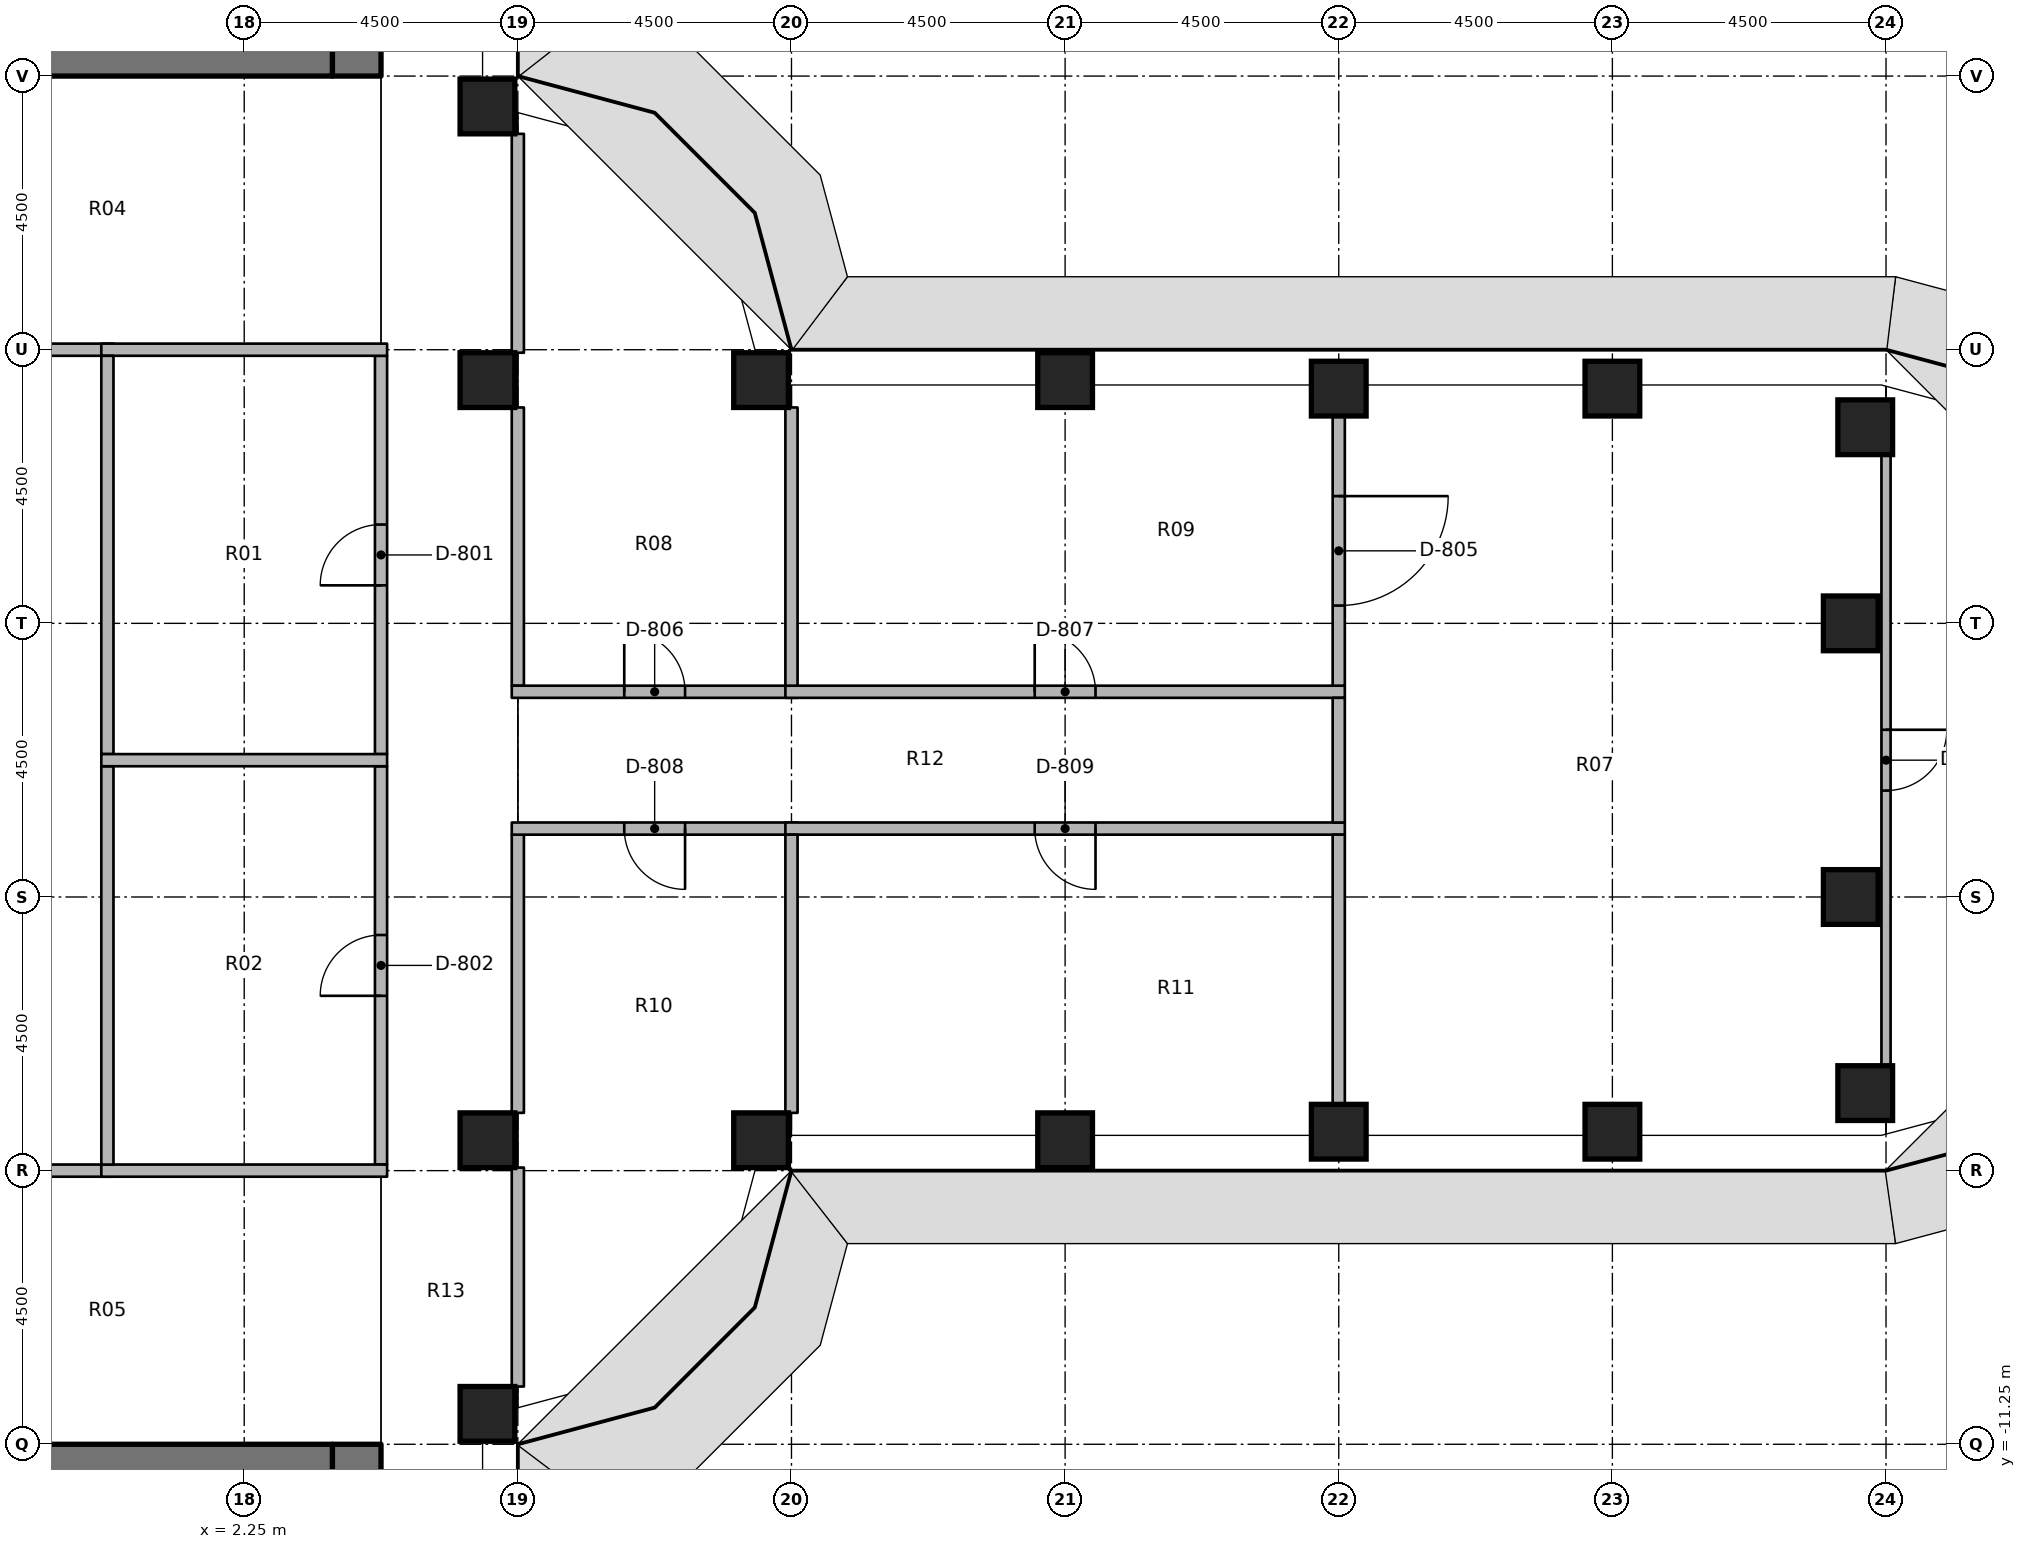
"""IFC4 building model, lengths in metres.
Left out: names, types, materials, properties, quantities, classifications, styles, units other than length and angle.
Written with IfcOpenShell. Run it as: python <this file> out.ifc"""

import sys

from ifc_helpers import new_model, si_unit, direction, frame, frame_2d, origin, origin_2d, place, context, subcontext, project, spatial, rectangle, extrude, element, fill, save


model = new_model("IFC4")
c1 = context("Model", 3, precision=1e-05, world=origin(), true_north=direction((0.0, 1.0)))
c2 = subcontext(c1, "Body", "Model", "MODEL_VIEW")
j1 = project(units=[si_unit("LENGTHUNIT", "METRE"), si_unit("PLANEANGLEUNIT", "RADIAN")], contexts=[c1])
p1 = place(None, origin())
s1 = spatial("IfcSite", under=j1, at=p1, CompositionType="ELEMENT")
p2 = place(p1, origin())
s2 = spatial("IfcBuilding", under=s1, at=p2, CompositionType="ELEMENT")
p3 = place(p2, frame((0.0, 0.0, 98.0)))
s3 = spatial("IfcBuildingStorey", under=s2, at=p3, CompositionType="ELEMENT", Elevation=98.0)
for number, where, z_axis, x_axis in (
    (1, (6.25, -10.75, 0.0), (0.0, 0.0, 1.0), (1.0, 0.0, 0.0)),
    (2, (6.25, -6.25, 0.0), (0.0, 0.0, 1.0), (1.0, 0.0, 0.0)),
    (3, (6.25, 6.25, 0.0), (0.0, 0.0, 1.0), (1.0, 0.0, 0.0)),
    (4, (6.25, 10.75, 0.0), (0.0, 0.0, 1.0), (1.0, 0.0, 0.0)),
    (5, (10.75, -6.25, 0.0), (0.0, 0.0, 1.0), (1.0, 0.0, 0.0)),
    (6, (10.75, 6.25, 0.0), (0.0, 0.0, 1.0), (1.0, 0.0, 0.0)),
    (7, (15.75, -6.25, 0.0), (0.0, 0.0, 1.0), (1.0, 0.0, 0.0)),
    (8, (15.75, 6.25, 0.0), (0.0, 0.0, 1.0), (1.0, 0.0, 0.0)),
    (9, (20.25, -6.11, 0.0), (0.0, 0.0, 1.0), (1.0, 0.0, 0.0)),
    (10, (20.25, 6.11, 0.0), (0.0, 0.0, 1.0), (1.0, 0.0, 0.0)),
    (11, (24.75, -6.11, 0.0), (0.0, 0.0, 1.0), (1.0, 0.0, 0.0)),
    (12, (24.75, 6.11, 0.0), (0.0, 0.0, 1.0), (1.0, 0.0, 0.0)),
    (13, (28.908, -5.475, 0.0), (0.0, 0.0, 1.0), (1.0, 0.0, 0.0)),
    (14, (28.67, -2.25, 0.0), (0.0, 0.0, 1.0), (1.0, 0.0, 0.0)),
    (15, (28.67, 2.25, 0.0), (0.0, 0.0, 1.0), (1.0, 0.0, 0.0)),
    (16, (28.908, 5.475, 0.0), (0.0, 0.0, 1.0), (1.0, 0.0, 0.0)),
):
    element("IfcColumn", number, at=place(p3, frame(where, z_axis=z_axis, x_axis=x_axis)), inside=s3, PredefinedType="COLUMN", context=c2, shape_type="SweptSolid", body=[
        extrude(rectangle(XDim=0.9, YDim=0.9, at=origin_2d()), origin(), (0.0, 0.0, 1.0), 3.65),
    ])
p4 = place(p3, frame((4.1, 11.25, 0.0), z_axis=(0.0, 0.0, 1.0), x_axis=(0.0, 1.0, 0.0)))
e17 = element("IfcWall", 17, at=p4, inside=s3, PredefinedType="SHEAR", context=c2, shape_type="SweptSolid", body=[
    extrude(rectangle(XDim=15.0, YDim=0.8, at=frame_2d((7.5, 0.0))), origin(), (0.0, 0.0, 1.0), 3.8),
])
p5 = place(p4, frame((7.15, 0.0, 0.0)))
e18 = element("IfcOpeningElement", 18, at=p5, cuts=e17, PredefinedType="OPENING", context=c2, shape_type="SweptSolid", body=[
    extrude(rectangle(XDim=1.5, YDim=2.3, at=frame_2d((0.75, 1.15))), frame((0.0, 0.41, 0.0), z_axis=(0.0, -1.0, 0.0), x_axis=(1.0, 0.0, 0.0)), (0.0, 0.0, 1.0), 0.82),
])
p6 = place(p4, frame((5.55, 0.0, 0.0)))
e19 = element("IfcOpeningElement", 19, at=p6, cuts=e17, PredefinedType="OPENING", context=c2, shape_type="SweptSolid", body=[
    extrude(rectangle(XDim=1.2, YDim=2.1, at=frame_2d((0.6, 1.05))), frame((0.0, 0.41, 0.0), z_axis=(0.0, -1.0, 0.0), x_axis=(1.0, 0.0, 0.0)), (0.0, 0.0, 1.0), 0.82),
])
p7 = place(p3, frame((-3.7, 11.65, 0.0), z_axis=(0.0, 0.0, 1.0), x_axis=(1.0, 0.0, 0.0)))
e20 = element("IfcWall", 20, at=p7, inside=s3, PredefinedType="SHEAR", context=c2, shape_type="SweptSolid", body=[
    extrude(rectangle(XDim=7.4, YDim=0.8, at=frame_2d((3.7, 0.0))), origin(), (0.0, 0.0, 1.0), 3.8),
])
p8 = place(p3, frame((4.1, -11.25, 0.0), z_axis=(0.0, 0.0, 1.0), x_axis=(0.0, -1.0, 0.0)))
e21 = element("IfcWall", 21, at=p8, inside=s3, PredefinedType="SHEAR", context=c2, shape_type="SweptSolid", body=[
    extrude(rectangle(XDim=15.0, YDim=0.8, at=frame_2d((7.5, 0.0))), origin(), (0.0, 0.0, 1.0), 3.8),
])
p9 = place(p8, frame((7.15, 0.0, 0.0)))
e22 = element("IfcOpeningElement", 22, at=p9, cuts=e21, PredefinedType="OPENING", context=c2, shape_type="SweptSolid", body=[
    extrude(rectangle(XDim=1.5, YDim=2.3, at=frame_2d((0.75, 1.15))), frame((0.0, 0.41, 0.0), z_axis=(0.0, -1.0, 0.0), x_axis=(1.0, 0.0, 0.0)), (0.0, 0.0, 1.0), 0.82),
])
p10 = place(p8, frame((13.9, 0.0, 0.0)))
e23 = element("IfcOpeningElement", 23, at=p10, cuts=e21, PredefinedType="OPENING", context=c2, shape_type="SweptSolid", body=[
    extrude(rectangle(XDim=0.9, YDim=2.1, at=frame_2d((0.45, 1.05))), frame((0.0, 0.41, 0.0), z_axis=(0.0, -1.0, 0.0), x_axis=(1.0, 0.0, 0.0)), (0.0, 0.0, 1.0), 0.82),
])
p11 = place(p8, frame((1.15, 0.0, 0.0)))
e24 = element("IfcOpeningElement", 24, at=p11, cuts=e21, PredefinedType="OPENING", context=c2, shape_type="SweptSolid", body=[
    extrude(rectangle(XDim=1.2, YDim=2.1, at=frame_2d((0.6, 1.05))), frame((0.0, 0.41, 0.0), z_axis=(0.0, -1.0, 0.0), x_axis=(1.0, 0.0, 0.0)), (0.0, 0.0, 1.0), 0.82),
])
p12 = place(p3, frame((-3.7, -11.65, 0.0), z_axis=(0.0, 0.0, 1.0), x_axis=(1.0, 0.0, 0.0)))
e25 = element("IfcWall", 25, at=p12, inside=s3, PredefinedType="SHEAR", context=c2, shape_type="SweptSolid", body=[
    extrude(rectangle(XDim=7.4, YDim=0.8, at=frame_2d((3.7, 0.0))), origin(), (0.0, 0.0, 1.0), 3.8),
])
p13 = place(p3, frame((4.5, 0.1, 0.0), z_axis=(0.0, 0.0, 1.0), x_axis=(0.0, 1.0, 0.0)))
e26 = element("IfcWall", 26, at=p13, inside=s3, PredefinedType="PARTITIONING", context=c2, shape_type="SweptSolid", body=[
    extrude(rectangle(XDim=6.55, YDim=0.2, at=frame_2d((3.275, 0.0))), origin(), (0.0, 0.0, 1.0), 2.738),
])
p14 = place(p13, frame((2.775, 0.0, 0.0)))
e27 = element("IfcOpeningElement", 27, at=p14, cuts=e26, PredefinedType="OPENING", context=c2, shape_type="SweptSolid", body=[
    extrude(rectangle(XDim=1.0, YDim=2.1, at=frame_2d((0.5, 1.05))), frame((0.0, 0.11, 0.0), z_axis=(0.0, -1.0, 0.0), x_axis=(1.0, 0.0, 0.0)), (0.0, 0.0, 1.0), 0.22),
])
p15 = place(p3, frame((4.5, -6.65, 0.0), z_axis=(0.0, 0.0, 1.0), x_axis=(0.0, 1.0, 0.0)))
e28 = element("IfcWall", 28, at=p15, inside=s3, PredefinedType="PARTITIONING", context=c2, shape_type="SweptSolid", body=[
    extrude(rectangle(XDim=6.55, YDim=0.2, at=frame_2d((3.275, 0.0))), origin(), (0.0, 0.0, 1.0), 2.738),
])
p16 = place(p15, frame((2.775, 0.0, 0.0)))
e29 = element("IfcOpeningElement", 29, at=p16, cuts=e28, PredefinedType="OPENING", context=c2, shape_type="SweptSolid", body=[
    extrude(rectangle(XDim=1.0, YDim=2.1, at=frame_2d((0.5, 1.05))), frame((0.0, 0.11, 0.0), z_axis=(0.0, -1.0, 0.0), x_axis=(1.0, 0.0, 0.0)), (0.0, 0.0, 1.0), 0.22),
])
p17 = place(p3, frame((6.75, 1.225, 0.0), z_axis=(0.0, 0.0, 1.0), x_axis=(0.0, 1.0, 0.0)))
e30 = element("IfcWall", 30, at=p17, inside=s3, PredefinedType="PARTITIONING", context=c2, shape_type="SweptSolid", body=[
    extrude(rectangle(XDim=4.575, YDim=0.2, at=frame_2d((2.288, 0.0))), origin(), (0.0, 0.0, 1.0), 2.738),
])
for number, where, z_axis, x_axis in (
    (31, (6.75, 6.7, 0.0), (0.0, 0.0, 1.0), (0.0, 1.0, 0.0)),
    (32, (6.75, -10.3, 0.0), (0.0, 0.0, 1.0), (0.0, 1.0, 0.0)),
):
    element("IfcWall", number, at=place(p3, frame(where, z_axis=z_axis, x_axis=x_axis)), inside=s3, PredefinedType="PARTITIONING", context=c2, shape_type="SweptSolid", body=[
        extrude(rectangle(XDim=3.6, YDim=0.2, at=frame_2d((1.8, 0.0))), origin(), (0.0, 0.0, 1.0), 2.738),
    ])
p18 = place(p3, frame((6.75, -5.8, 0.0), z_axis=(0.0, 0.0, 1.0), x_axis=(0.0, 1.0, 0.0)))
e33 = element("IfcWall", 33, at=p18, inside=s3, PredefinedType="PARTITIONING", context=c2, shape_type="SweptSolid", body=[
    extrude(rectangle(XDim=4.575, YDim=0.2, at=frame_2d((2.288, 0.0))), origin(), (0.0, 0.0, 1.0), 2.738),
])
for number, where, z_axis, x_axis in (
    (34, (-4.6, 6.75, 0.0), (0.0, 0.0, 1.0), (1.0, 0.0, 0.0)),
    (35, (-0.1, 6.75, 0.0), (0.0, 0.0, 1.0), (1.0, 0.0, 0.0)),
    (36, (-4.6, -6.75, 0.0), (0.0, 0.0, 1.0), (1.0, 0.0, 0.0)),
    (37, (-0.1, -6.75, 0.0), (0.0, 0.0, 1.0), (1.0, 0.0, 0.0)),
):
    element("IfcWall", number, at=place(p3, frame(where, z_axis=z_axis, x_axis=x_axis)), inside=s3, PredefinedType="PARTITIONING", context=c2, shape_type="SweptSolid", body=[
        extrude(rectangle(XDim=4.7, YDim=0.2, at=frame_2d((2.35, 0.0))), origin(), (0.0, 0.0, 1.0), 2.738),
    ])
for number, where, z_axis, x_axis in (
    (38, (0.0, 0.1, 0.0), (0.0, 0.0, 1.0), (0.0, 1.0, 0.0)),
    (39, (0.0, -6.65, 0.0), (0.0, 0.0, 1.0), (0.0, 1.0, 0.0)),
):
    element("IfcWall", number, at=place(p3, frame(where, z_axis=z_axis, x_axis=x_axis)), inside=s3, PredefinedType="PARTITIONING", context=c2, shape_type="SweptSolid", body=[
        extrude(rectangle(XDim=6.55, YDim=0.2, at=frame_2d((3.275, 0.0))), origin(), (0.0, 0.0, 1.0), 2.738),
    ])
p19 = place(p3, frame((-0.1, 0.0, 0.0), z_axis=(0.0, 0.0, 1.0), x_axis=(1.0, 0.0, 0.0)))
e40 = element("IfcWall", 40, at=p19, inside=s3, PredefinedType="PARTITIONING", context=c2, shape_type="SweptSolid", body=[
    extrude(rectangle(XDim=4.7, YDim=0.2, at=frame_2d((2.35, 0.0))), origin(), (0.0, 0.0, 1.0), 2.738),
])
p20 = place(p3, frame((6.65, 1.125, 0.0), z_axis=(0.0, 0.0, 1.0), x_axis=(1.0, 0.0, 0.0)))
e41 = element("IfcWall", 41, at=p20, inside=s3, PredefinedType="PARTITIONING", context=c2, shape_type="SweptSolid", body=[
    extrude(rectangle(XDim=4.7, YDim=0.2, at=frame_2d((2.35, 0.0))), origin(), (0.0, 0.0, 1.0), 2.738),
])
p21 = place(p20, frame((1.85, 0.0, 0.0)))
e42 = element("IfcOpeningElement", 42, at=p21, cuts=e41, PredefinedType="OPENING", context=c2, shape_type="SweptSolid", body=[
    extrude(rectangle(XDim=1.0, YDim=2.1, at=frame_2d((0.5, 1.05))), frame((0.0, 0.11, 0.0), z_axis=(0.0, -1.0, 0.0), x_axis=(1.0, 0.0, 0.0)), (0.0, 0.0, 1.0), 0.22),
])
p22 = place(p3, frame((11.35, -1.125, 0.0), z_axis=(0.0, 0.0, 1.0), x_axis=(-1.0, 0.0, 0.0)))
e43 = element("IfcWall", 43, at=p22, inside=s3, PredefinedType="PARTITIONING", context=c2, shape_type="SweptSolid", body=[
    extrude(rectangle(XDim=4.7, YDim=0.2, at=frame_2d((2.35, 0.0))), origin(), (0.0, 0.0, 1.0), 2.738),
])
p23 = place(p22, frame((1.85, 0.0, 0.0)))
e44 = element("IfcOpeningElement", 44, at=p23, cuts=e43, PredefinedType="OPENING", context=c2, shape_type="SweptSolid", body=[
    extrude(rectangle(XDim=1.0, YDim=2.1, at=frame_2d((0.5, 1.05))), frame((0.0, 0.11, 0.0), z_axis=(0.0, -1.0, 0.0), x_axis=(1.0, 0.0, 0.0)), (0.0, 0.0, 1.0), 0.22),
])
p24 = place(p3, frame((11.15, 1.125, 0.0), z_axis=(0.0, 0.0, 1.0), x_axis=(1.0, 0.0, 0.0)))
e45 = element("IfcWall", 45, at=p24, inside=s3, PredefinedType="PARTITIONING", context=c2, shape_type="SweptSolid", body=[
    extrude(rectangle(XDim=9.2, YDim=0.2, at=frame_2d((4.6, 0.0))), origin(), (0.0, 0.0, 1.0), 2.738),
])
p25 = place(p24, frame((4.1, 0.0, 0.0)))
e46 = element("IfcOpeningElement", 46, at=p25, cuts=e45, PredefinedType="OPENING", context=c2, shape_type="SweptSolid", body=[
    extrude(rectangle(XDim=1.0, YDim=2.1, at=frame_2d((0.5, 1.05))), frame((0.0, 0.11, 0.0), z_axis=(0.0, -1.0, 0.0), x_axis=(1.0, 0.0, 0.0)), (0.0, 0.0, 1.0), 0.22),
])
p26 = place(p3, frame((20.35, -1.125, 0.0), z_axis=(0.0, 0.0, 1.0), x_axis=(-1.0, 0.0, 0.0)))
e47 = element("IfcWall", 47, at=p26, inside=s3, PredefinedType="PARTITIONING", context=c2, shape_type="SweptSolid", body=[
    extrude(rectangle(XDim=9.2, YDim=0.2, at=frame_2d((4.6, 0.0))), origin(), (0.0, 0.0, 1.0), 2.738),
])
p27 = place(p26, frame((4.1, 0.0, 0.0)))
e48 = element("IfcOpeningElement", 48, at=p27, cuts=e47, PredefinedType="OPENING", context=c2, shape_type="SweptSolid", body=[
    extrude(rectangle(XDim=1.0, YDim=2.1, at=frame_2d((0.5, 1.05))), frame((0.0, 0.11, 0.0), z_axis=(0.0, -1.0, 0.0), x_axis=(1.0, 0.0, 0.0)), (0.0, 0.0, 1.0), 0.22),
])
p28 = place(p3, frame((20.25, -1.025, 0.0), z_axis=(0.0, 0.0, 1.0), x_axis=(0.0, 1.0, 0.0)))
e49 = element("IfcWall", 49, at=p28, inside=s3, PredefinedType="PARTITIONING", context=c2, shape_type="SweptSolid", body=[
    extrude(rectangle(XDim=2.05, YDim=0.2, at=frame_2d((1.025, 0.0))), origin(), (0.0, 0.0, 1.0), 2.738),
])
for number, where, z_axis, x_axis in (
    (50, (11.25, 1.225, 0.0), (0.0, 0.0, 1.0), (0.0, 1.0, 0.0)),
    (51, (11.25, -5.8, 0.0), (0.0, 0.0, 1.0), (0.0, 1.0, 0.0)),
):
    element("IfcWall", number, at=place(p3, frame(where, z_axis=z_axis, x_axis=x_axis)), inside=s3, PredefinedType="PARTITIONING", context=c2, shape_type="SweptSolid", body=[
        extrude(rectangle(XDim=4.575, YDim=0.2, at=frame_2d((2.288, 0.0))), origin(), (0.0, 0.0, 1.0), 2.738),
    ])
p29 = place(p3, frame((20.25, 5.66, 0.0), z_axis=(0.0, 0.0, 1.0), x_axis=(0.0, -1.0, 0.0)))
e52 = element("IfcWall", 52, at=p29, inside=s3, PredefinedType="PARTITIONING", context=c2, shape_type="SweptSolid", body=[
    extrude(rectangle(XDim=4.435, YDim=0.2, at=frame_2d((2.217, 0.0))), origin(), (0.0, 0.0, 1.0), 2.738),
])
p30 = place(p29, frame((1.317, 0.0, 0.0)))
e53 = element("IfcOpeningElement", 53, at=p30, cuts=e52, PredefinedType="OPENING", context=c2, shape_type="SweptSolid", body=[
    extrude(rectangle(XDim=1.8, YDim=2.1, at=frame_2d((0.9, 1.05))), frame((0.0, 0.11, 0.0), z_axis=(0.0, -1.0, 0.0), x_axis=(1.0, 0.0, 0.0)), (0.0, 0.0, 1.0), 0.22),
])
p31 = place(p3, frame((20.25, -5.66, 0.0), z_axis=(0.0, 0.0, 1.0), x_axis=(0.0, 1.0, 0.0)))
e54 = element("IfcWall", 54, at=p31, inside=s3, PredefinedType="PARTITIONING", context=c2, shape_type="SweptSolid", body=[
    extrude(rectangle(XDim=4.435, YDim=0.2, at=frame_2d((2.217, 0.0))), origin(), (0.0, 0.0, 1.0), 2.738),
])
p32 = place(p3, frame((29.25, 5.025, 0.0), z_axis=(0.0, 0.0, 1.0), x_axis=(0.0, -1.0, 0.0)))
e55 = element("IfcWall", 55, at=p32, inside=s3, PredefinedType="PARTITIONING", context=c2, shape_type="SweptSolid", body=[
    extrude(rectangle(XDim=10.05, YDim=0.15, at=frame_2d((5.025, 0.0))), origin(), (0.0, 0.0, 1.0), 2.738),
])
p33 = place(p32, frame((4.525, 0.0, 0.0)))
e56 = element("IfcOpeningElement", 56, at=p33, cuts=e55, PredefinedType="OPENING", context=c2, shape_type="SweptSolid", body=[
    extrude(rectangle(XDim=1.0, YDim=2.1, at=frame_2d((0.5, 1.05))), frame((0.0, 0.085, 0.0), z_axis=(0.0, -1.0, 0.0), x_axis=(1.0, 0.0, 0.0)), (0.0, 0.0, 1.0), 0.17),
])
p34 = place(p14, origin())
e57 = element("IfcDoor", 57, at=p34, inside=s3, OperationType="SINGLE_SWING_LEFT", PredefinedType="DOOR", context=c2, shape_type="SweptSolid", body=[
    extrude(rectangle(XDim=1.0, YDim=2.1, at=frame_2d((0.5, 1.05))), frame((0.0, 0.025, 0.0), z_axis=(0.0, -1.0, 0.0), x_axis=(1.0, 0.0, 0.0)), (0.0, 0.0, 1.0), 0.05),
])
fill(e27, e57)
p35 = place(p16, origin())
e58 = element("IfcDoor", 58, at=p35, inside=s3, OperationType="SINGLE_SWING_RIGHT", PredefinedType="DOOR", context=c2, shape_type="SweptSolid", body=[
    extrude(rectangle(XDim=1.0, YDim=2.1, at=frame_2d((0.5, 1.05))), frame((0.0, 0.025, 0.0), z_axis=(0.0, -1.0, 0.0), x_axis=(1.0, 0.0, 0.0)), (0.0, 0.0, 1.0), 0.05),
])
fill(e29, e58)
p36 = place(p33, origin())
e59 = element("IfcDoor", 59, at=p36, inside=s3, OperationType="SINGLE_SWING_RIGHT", PredefinedType="DOOR", context=c2, shape_type="SweptSolid", body=[
    extrude(rectangle(XDim=1.0, YDim=2.1, at=frame_2d((0.5, 1.05))), frame((0.0, 0.025, 0.0), z_axis=(0.0, -1.0, 0.0), x_axis=(1.0, 0.0, 0.0)), (0.0, 0.0, 1.0), 0.05),
])
fill(e56, e59)
p37 = place(p30, origin())
e60 = element("IfcDoor", 60, at=p37, inside=s3, OperationType="DOUBLE_DOOR_SINGLE_SWING", PredefinedType="DOOR", context=c2, shape_type="SweptSolid", body=[
    extrude(rectangle(XDim=1.8, YDim=2.1, at=frame_2d((0.9, 1.05))), frame((0.0, 0.025, 0.0), z_axis=(0.0, -1.0, 0.0), x_axis=(1.0, 0.0, 0.0)), (0.0, 0.0, 1.0), 0.05),
])
fill(e53, e60)
p38 = place(p21, origin())
e61 = element("IfcDoor", 61, at=p38, inside=s3, OperationType="SINGLE_SWING_RIGHT", PredefinedType="DOOR", context=c2, shape_type="SweptSolid", body=[
    extrude(rectangle(XDim=1.0, YDim=2.1, at=frame_2d((0.5, 1.05))), frame((0.0, 0.025, 0.0), z_axis=(0.0, -1.0, 0.0), x_axis=(1.0, 0.0, 0.0)), (0.0, 0.0, 1.0), 0.05),
])
fill(e42, e61)
p39 = place(p25, origin())
e62 = element("IfcDoor", 62, at=p39, inside=s3, OperationType="SINGLE_SWING_LEFT", PredefinedType="DOOR", context=c2, shape_type="SweptSolid", body=[
    extrude(rectangle(XDim=1.0, YDim=2.1, at=frame_2d((0.5, 1.05))), frame((0.0, 0.025, 0.0), z_axis=(0.0, -1.0, 0.0), x_axis=(1.0, 0.0, 0.0)), (0.0, 0.0, 1.0), 0.05),
])
fill(e46, e62)
p40 = place(p23, origin())
e63 = element("IfcDoor", 63, at=p40, inside=s3, OperationType="SINGLE_SWING_RIGHT", PredefinedType="DOOR", context=c2, shape_type="SweptSolid", body=[
    extrude(rectangle(XDim=1.0, YDim=2.1, at=frame_2d((0.5, 1.05))), frame((0.0, 0.025, 0.0), z_axis=(0.0, -1.0, 0.0), x_axis=(1.0, 0.0, 0.0)), (0.0, 0.0, 1.0), 0.05),
])
fill(e44, e63)
p41 = place(p27, origin())
e64 = element("IfcDoor", 64, at=p41, inside=s3, OperationType="SINGLE_SWING_RIGHT", PredefinedType="DOOR", context=c2, shape_type="SweptSolid", body=[
    extrude(rectangle(XDim=1.0, YDim=2.1, at=frame_2d((0.5, 1.05))), frame((0.0, 0.025, 0.0), z_axis=(0.0, -1.0, 0.0), x_axis=(1.0, 0.0, 0.0)), (0.0, 0.0, 1.0), 0.05),
])
fill(e48, e64)
save(model, sys.argv[1])
